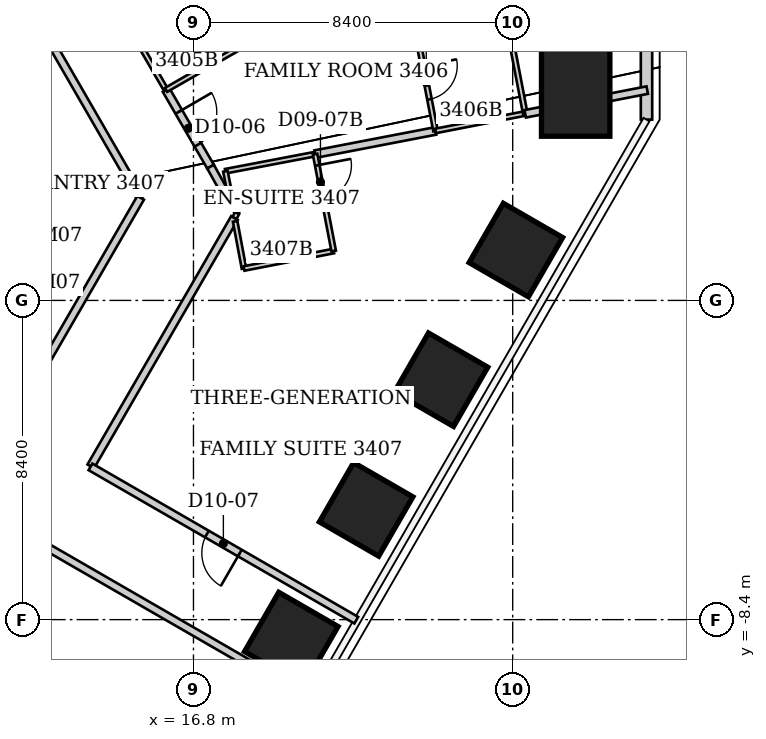
"""IFC4 building model, lengths in metres.
Left out: names, types, materials, properties, quantities, classifications, styles, units other than length and angle.
Written with IfcOpenShell. Run it as: python <this file> out.ifc"""

import sys

from ifc_helpers import new_model, si_unit, direction, frame, frame_2d, origin, origin_2d, place, context, subcontext, project, spatial, rectangle, extrude, element, fill, save


model = new_model("IFC4")
c1 = context("Model", 3, precision=1e-05, world=origin(), true_north=direction((0.0, 1.0)))
c2 = subcontext(c1, "Body", "Model", "MODEL_VIEW")
j1 = project(units=[si_unit("LENGTHUNIT", "METRE"), si_unit("PLANEANGLEUNIT", "RADIAN")], contexts=[c1])
p1 = place(None, origin())
s1 = spatial("IfcSite", under=j1, at=p1, CompositionType="ELEMENT")
p2 = place(p1, origin())
s2 = spatial("IfcBuilding", under=s1, at=p2, CompositionType="ELEMENT")
p3 = place(p2, frame((0.0, 0.0, 138.6)))
s3 = spatial("IfcBuildingStorey", under=s2, at=p3, CompositionType="ELEMENT", Elevation=138.6)
p4 = place(p3, frame((26.857, 5.67, 0.0), z_axis=(0.0, 0.0, 1.0), x_axis=(1.0, 0.0, 0.0)))
e1 = element("IfcColumn", 1, at=p4, inside=s3, PredefinedType="COLUMN", context=c2, shape_type="SweptSolid", body=[
    extrude(rectangle(XDim=1.8, YDim=2.7, at=origin_2d()), origin(), (0.0, 0.0, 1.0), 3.8),
])
for number, where, z_axis, x_axis in (
    (2, (25.284, 1.325, 0.0), (0.0, 0.0, 1.0), (0.866, -0.5, 0.0)),
    (3, (23.314, -2.087, 0.0), (0.0, 0.0, 1.0), (0.866, -0.5, 0.0)),
    (4, (21.344, -5.499, 0.0), (0.0, 0.0, 1.0), (0.866, -0.5, 0.0)),
    (5, (19.374, -8.911, 0.0), (0.0, 0.0, 1.0), (0.866, -0.5, 0.0)),
):
    element("IfcColumn", number, at=place(p3, frame(where, z_axis=z_axis, x_axis=x_axis)), inside=s3, PredefinedType="COLUMN", context=c2, shape_type="SweptSolid", body=[
        extrude(rectangle(XDim=1.8, YDim=1.8, at=origin_2d()), origin(), (0.0, 0.0, 1.0), 3.8),
    ])
p5 = place(p3, frame((28.721, 6.638, 0.0), z_axis=(0.0, 0.0, 1.0), x_axis=(0.0, -1.0, 0.0)))
e6 = element("IfcWall", 6, at=p5, inside=s3, PredefinedType="SOLIDWALL", context=c2, shape_type="SweptSolid", body=[
    extrude(rectangle(XDim=1.88, YDim=0.3, at=frame_2d((0.94, 0.0))), origin(), (0.0, 0.0, 1.0), 3.64),
])
p6 = place(p3, frame((10.84, 10.61, 0.0), z_axis=(0.0, 0.0, 1.0), x_axis=(0.500237524763, -0.865888225361, 0.0)))
e7 = element("IfcWall", 7, at=p6, inside=s3, PredefinedType="PARTITIONING", context=c2, shape_type="SweptSolid", body=[
    extrude(rectangle(XDim=9.135, YDim=0.2, at=frame_2d((4.568, 0.0))), origin(), (0.0, 0.0, 1.0), 3.64),
])
p7 = place(p3, frame((12.903, -6.468, 0.0), z_axis=(0.0, 0.0, 1.0), x_axis=(0.866179534239, -0.499732943147, 0.0)))
e8 = element("IfcWall", 8, at=p7, inside=s3, PredefinedType="PARTITIONING", context=c2, shape_type="SweptSolid", body=[
    extrude(rectangle(XDim=8.06, YDim=0.2, at=frame_2d((4.03, 0.0))), origin(), (0.0, 0.0, 1.0), 3.64),
])
p8 = place(p3, frame((14.097, -4.367, 0.0), z_axis=(0.0, 0.0, 1.0), x_axis=(0.500859137679, 0.865528811885, 0.0)))
e9 = element("IfcWall", 9, at=p8, inside=s3, PredefinedType="PARTITIONING", context=c2, shape_type="SweptSolid", body=[
    extrude(rectangle(XDim=7.552, YDim=0.2, at=frame_2d((3.776, 0.0))), origin(), (0.0, 0.0, 1.0), 3.64),
])
p9 = place(p3, frame((14.85, 7.66, 0.0), z_axis=(0.0, 0.0, 1.0), x_axis=(0.501236510024, -0.865310326426, 0.0)))
e10 = element("IfcWall", 10, at=p9, inside=s3, PredefinedType="PARTITIONING", context=c2, shape_type="SweptSolid", body=[
    extrude(rectangle(XDim=2.451, YDim=0.12, at=frame_2d((1.226, 0.0))), origin(), (0.0, 0.0, 1.0), 3.64),
])
p10 = place(p3, frame((15.41, 2.7, 0.0), z_axis=(0.0, 0.0, 1.0), x_axis=(-0.500372062762, -0.865810486658, 0.0)))
e11 = element("IfcWall", 11, at=p10, inside=s3, PredefinedType="PARTITIONING", context=c2, shape_type="SweptSolid", body=[
    extrude(rectangle(XDim=8.913, YDim=0.2, at=frame_2d((4.457, 0.0))), origin(), (0.0, 0.0, 1.0), 3.64),
])
p11 = place(p3, frame((16.079, 5.539, 0.0), z_axis=(0.0, 0.0, 1.0), x_axis=(0.501782258451, -0.864993968247, 0.0)))
e12 = element("IfcWall", 12, at=p11, inside=s3, PredefinedType="PARTITIONING", context=c2, shape_type="SweptSolid", body=[
    extrude(rectangle(XDim=2.334, YDim=0.2, at=frame_2d((1.167, 0.0))), origin(), (0.0, 0.0, 1.0), 3.64),
])
p12 = place(p11, frame((0.667, 0.0, 0.0)))
e13 = element("IfcOpeningElement", 13, at=p12, cuts=e12, PredefinedType="OPENING", context=c2, shape_type="SweptSolid", body=[
    extrude(rectangle(XDim=1.0, YDim=2.13, at=frame_2d((0.5, 1.065))), frame((0.0, 0.1, 0.0), z_axis=(0.0, -1.0, 0.0), x_axis=(1.0, 0.0, 0.0)), (0.0, 0.0, 1.0), 0.2),
])
p13 = place(p3, frame((16.08, 5.54, 0.0), z_axis=(0.0, 0.0, 1.0), x_axis=(0.86663205897, 0.498947767172, 0.0)))
e14 = element("IfcWall", 14, at=p13, inside=s3, PredefinedType="PARTITIONING", context=c2, shape_type="SweptSolid", body=[
    extrude(rectangle(XDim=2.665, YDim=0.12, at=frame_2d((1.333, 0.0))), origin(), (0.0, 0.0, 1.0), 3.64),
])
p14 = place(p3, frame((17.25, 3.52, 0.0), z_axis=(0.0, 0.0, 1.0), x_axis=(0.485489114803, -0.874242711956, 0.0)))
e15 = element("IfcWall", 15, at=p14, inside=s3, PredefinedType="PARTITIONING", context=c2, shape_type="SweptSolid", body=[
    extrude(rectangle(XDim=0.674, YDim=0.2, at=frame_2d((0.337, 0.0))), origin(), (0.0, 0.0, 1.0), 3.64),
])
p15 = place(p3, frame((17.64, 3.4, 0.0), z_axis=(0.0, 0.0, 1.0), x_axis=(0.982288725898, 0.187373581313, 0.0)))
e16 = element("IfcWall", 16, at=p15, inside=s3, PredefinedType="PARTITIONING", context=c2, shape_type="SweptSolid", body=[
    extrude(rectangle(XDim=2.403, YDim=0.12, at=frame_2d((1.201, 0.0))), origin(), (0.0, 0.0, 1.0), 3.64),
])
p16 = place(p3, frame((17.72, 2.7, 0.0), z_axis=(0.0, 0.0, 1.0), x_axis=(0.498530782172, -0.866871997025, 0.0)))
e17 = element("IfcWall", 17, at=p16, inside=s3, PredefinedType="PARTITIONING", context=c2, shape_type="SweptSolid", body=[
    extrude(rectangle(XDim=0.461, YDim=0.12, at=frame_2d((0.231, 0.0))), origin(), (0.0, 0.0, 1.0), 3.64),
])
p17 = place(p3, frame((17.774, 2.731, 0.0), z_axis=(0.0, 0.0, 1.0), x_axis=(-0.196253874553, 0.980553117747, 0.0)))
e18 = element("IfcWall", 18, at=p17, inside=s3, PredefinedType="PARTITIONING", context=c2, shape_type="SweptSolid", body=[
    extrude(rectangle(XDim=0.682, YDim=0.12, at=frame_2d((0.341, 0.0))), origin(), (0.0, 0.0, 1.0), 3.64),
])
p18 = place(p3, frame((17.88, 2.17, 0.0), z_axis=(0.0, 0.0, 1.0), x_axis=(0.474099823035, 0.880471099922, 0.0)))
e19 = element("IfcWall", 19, at=p18, inside=s3, PredefinedType="PARTITIONING", context=c2, shape_type="SweptSolid", body=[
    extrude(rectangle(XDim=0.148, YDim=0.12, at=frame_2d((0.074, 0.0))), origin(), (0.0, 0.0, 1.0), 3.64),
])
p19 = place(p3, frame((17.897, 2.082, 0.0), z_axis=(0.0, 0.0, 1.0), x_axis=(0.184580266957, -0.982817442382, 0.0)))
e20 = element("IfcWall", 20, at=p19, inside=s3, PredefinedType="PARTITIONING", context=c2, shape_type="SweptSolid", body=[
    extrude(rectangle(XDim=1.263, YDim=0.12, at=frame_2d((0.632, 0.0))), origin(), (0.0, 0.0, 1.0), 3.64),
])
p20 = place(p3, frame((18.13, 0.84, 0.0), z_axis=(0.0, 0.0, 1.0), x_axis=(0.981533392326, 0.191290877329, 0.0)))
e21 = element("IfcWall", 21, at=p20, inside=s3, PredefinedType="PARTITIONING", context=c2, shape_type="SweptSolid", body=[
    extrude(rectangle(XDim=2.405, YDim=0.12, at=frame_2d((1.202, 0.0))), origin(), (0.0, 0.0, 1.0), 3.64),
])
p21 = place(p3, frame((20.0, 3.85, 0.0), z_axis=(0.0, 0.0, 1.0), x_axis=(0.981991339242, 0.188925936955, 0.0)))
e22 = element("IfcWall", 22, at=p21, inside=s3, PredefinedType="PARTITIONING", context=c2, shape_type="SweptSolid", body=[
    extrude(rectangle(XDim=3.228, YDim=0.2, at=frame_2d((1.614, 0.0))), origin(), (0.0, 0.0, 1.0), 3.64),
])
p22 = place(p3, frame((20.49, 1.3, 0.0), z_axis=(0.0, 0.0, 1.0), x_axis=(-0.188697442844, 0.982035271802, 0.0)))
e23 = element("IfcWall", 23, at=p22, inside=s3, PredefinedType="PARTITIONING", context=c2, shape_type="SweptSolid", body=[
    extrude(rectangle(XDim=2.597, YDim=0.12, at=frame_2d((1.298, 0.0))), origin(), (0.0, 0.0, 1.0), 3.64),
])
p23 = place(p22, frame((1.397, 0.0, 0.0)))
e24 = element("IfcOpeningElement", 24, at=p23, cuts=e23, PredefinedType="OPENING", context=c2, shape_type="SweptSolid", body=[
    extrude(rectangle(XDim=0.9, YDim=2.03, at=frame_2d((0.45, 1.015))), frame((0.0, 0.06, 0.0), z_axis=(0.0, -1.0, 0.0), x_axis=(1.0, 0.0, 0.0)), (0.0, 0.0, 1.0), 0.12),
])
p24 = place(p3, frame((21.084, -8.415, 0.0), z_axis=(0.0, 0.0, 1.0), x_axis=(-0.866174008169, 0.499742521277, 0.0)))
e25 = element("IfcWall", 25, at=p24, inside=s3, PredefinedType="PARTITIONING", context=c2, shape_type="SweptSolid", body=[
    extrude(rectangle(XDim=8.074, YDim=0.2, at=frame_2d((4.037, 0.0))), origin(), (0.0, 0.0, 1.0), 3.64),
])
p25 = place(p24, frame((3.537, 0.0, 0.0)))
e26 = element("IfcOpeningElement", 26, at=p25, cuts=e25, PredefinedType="OPENING", context=c2, shape_type="SweptSolid", body=[
    extrude(rectangle(XDim=1.0, YDim=2.13, at=frame_2d((0.5, 1.065))), frame((0.0, 0.1, 0.0), z_axis=(0.0, -1.0, 0.0), x_axis=(1.0, 0.0, 0.0)), (0.0, 0.0, 1.0), 0.2),
])
p26 = place(p3, frame((22.68, 7.01, 0.0), z_axis=(0.0, 0.0, 1.0), x_axis=(0.188697442844, -0.982035271802, 0.0)))
e27 = element("IfcWall", 27, at=p26, inside=s3, PredefinedType="PARTITIONING", context=c2, shape_type="SweptSolid", body=[
    extrude(rectangle(XDim=2.597, YDim=0.12, at=frame_2d((1.298, 0.0))), origin(), (0.0, 0.0, 1.0), 3.64),
])
p27 = place(p26, frame((0.85, 0.0, 0.0)))
e28 = element("IfcOpeningElement", 28, at=p27, cuts=e27, PredefinedType="OPENING", context=c2, shape_type="SweptSolid", body=[
    extrude(rectangle(XDim=0.9, YDim=2.03, at=frame_2d((0.45, 1.015))), frame((0.0, 0.06, 0.0), z_axis=(0.0, -1.0, 0.0), x_axis=(1.0, 0.0, 0.0)), (0.0, 0.0, 1.0), 0.12),
])
p28 = place(p3, frame((23.17, 4.46, 0.0), z_axis=(0.0, 0.0, 1.0), x_axis=(0.981533392326, 0.191290877329, 0.0)))
e29 = element("IfcWall", 29, at=p28, inside=s3, PredefinedType="PARTITIONING", context=c2, shape_type="SweptSolid", body=[
    extrude(rectangle(XDim=2.405, YDim=0.12, at=frame_2d((1.202, 0.0))), origin(), (0.0, 0.0, 1.0), 3.64),
])
p29 = place(p3, frame((25.53, 4.92, 0.0), z_axis=(0.0, 0.0, 1.0), x_axis=(-0.188697442844, 0.982035271802, 0.0)))
e30 = element("IfcWall", 30, at=p29, inside=s3, PredefinedType="PARTITIONING", context=c2, shape_type="SweptSolid", body=[
    extrude(rectangle(XDim=2.597, YDim=0.12, at=frame_2d((1.298, 0.0))), origin(), (0.0, 0.0, 1.0), 3.64),
])
p30 = place(p3, frame((28.74, 5.534, 0.0), z_axis=(0.0, 0.0, 1.0), x_axis=(-0.98161461266, -0.190873655101, 0.0)))
e31 = element("IfcWall", 31, at=p30, inside=s3, PredefinedType="PARTITIONING", context=c2, shape_type="SweptSolid", body=[
    extrude(rectangle(XDim=3.271, YDim=0.2, at=frame_2d((1.635, 0.0))), origin(), (0.0, 0.0, 1.0), 3.64),
])
p31 = place(p12, origin())
e32 = element("IfcDoor", 32, at=p31, inside=s3, OperationType="SINGLE_SWING_LEFT", PredefinedType="DOOR", context=c2, shape_type="SweptSolid", body=[
    extrude(rectangle(XDim=1.0, YDim=2.13, at=frame_2d((0.5, 1.065))), frame((0.0, 0.025, 0.0), z_axis=(0.0, -1.0, 0.0), x_axis=(1.0, 0.0, 0.0)), (0.0, 0.0, 1.0), 0.05),
])
fill(e13, e32)
p32 = place(p27, origin())
e33 = element("IfcDoor", 33, at=p32, inside=s3, OperationType="SINGLE_SWING_LEFT", PredefinedType="DOOR", context=c2, shape_type="SweptSolid", body=[
    extrude(rectangle(XDim=0.9, YDim=2.03, at=frame_2d((0.45, 1.015))), frame((0.0, 0.025, 0.0), z_axis=(0.0, -1.0, 0.0), x_axis=(1.0, 0.0, 0.0)), (0.0, 0.0, 1.0), 0.05),
])
fill(e28, e33)
p33 = place(p25, origin())
e34 = element("IfcDoor", 34, at=p33, inside=s3, OperationType="SINGLE_SWING_LEFT", PredefinedType="DOOR", context=c2, shape_type="SweptSolid", body=[
    extrude(rectangle(XDim=1.0, YDim=2.13, at=frame_2d((0.5, 1.065))), frame((0.0, 0.025, 0.0), z_axis=(0.0, -1.0, 0.0), x_axis=(1.0, 0.0, 0.0)), (0.0, 0.0, 1.0), 0.05),
])
fill(e26, e34)
p34 = place(p23, origin())
e35 = element("IfcDoor", 35, at=p34, inside=s3, OperationType="SINGLE_SWING_RIGHT", PredefinedType="DOOR", context=c2, shape_type="SweptSolid", body=[
    extrude(rectangle(XDim=0.9, YDim=2.03, at=frame_2d((0.45, 1.015))), frame((0.0, 0.025, 0.0), z_axis=(0.0, -1.0, 0.0), x_axis=(1.0, 0.0, 0.0)), (0.0, 0.0, 1.0), 0.05),
])
fill(e24, e35)
save(model, sys.argv[1])
